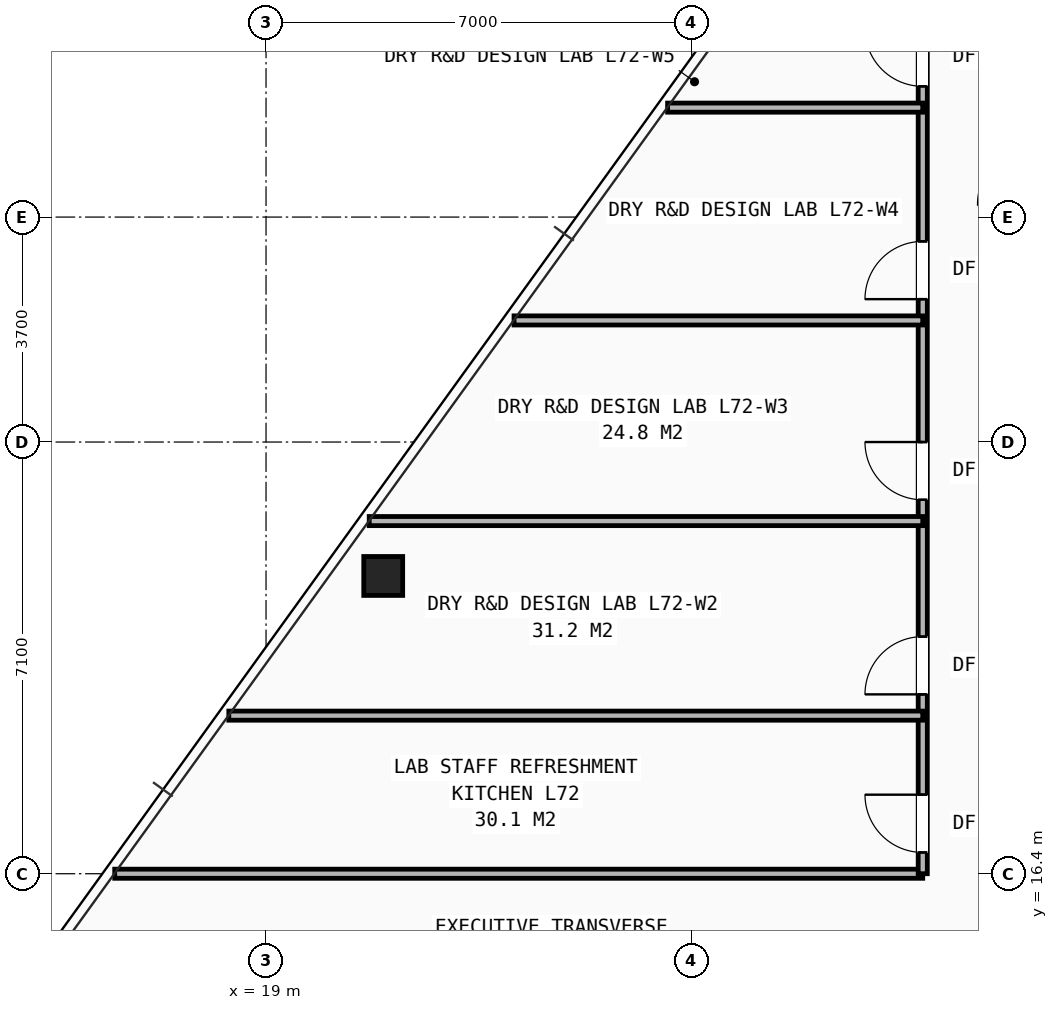
"""IFC4 building model, lengths in metres.
Left out: names, types, materials, properties, quantities, classifications, styles, units other than length and angle.
Written with IfcOpenShell. Run it as: python <this file> out.ifc"""

import sys

from ifc_helpers import new_model, si_unit, direction, frame, frame_2d, origin, origin_2d, place, context, subcontext, project, spatial, rectangle, hollow_rectangle, extrude, element, fill, save


model = new_model("IFC4")
c1 = context("Model", 3, precision=1e-05, world=origin(), true_north=direction((0.0, 1.0)))
c2 = subcontext(c1, "Body", "Model", "MODEL_VIEW")
j1 = project(units=[si_unit("LENGTHUNIT", "METRE"), si_unit("PLANEANGLEUNIT", "RADIAN")], contexts=[c1])
p1 = place(None, origin())
s1 = spatial("IfcSite", under=j1, at=p1, CompositionType="ELEMENT")
p2 = place(p1, origin())
s2 = spatial("IfcBuilding", under=s1, at=p2, CompositionType="ELEMENT")
p3 = place(p2, frame((0.0, 0.0, 255.0)))
s3 = spatial("IfcBuildingStorey", under=s2, at=p3, CompositionType="ELEMENT", Elevation=255.0)
p4 = place(p3, frame((20.927, 21.297, 0.0), z_axis=(0.0, 0.0, 1.0), x_axis=(1.0, 0.0, 0.0)))
e1 = element("IfcColumn", 1, at=p4, inside=s3, PredefinedType="COLUMN", context=c2, shape_type="SweptSolid", body=[
    extrude(hollow_rectangle(XDim=0.64, YDim=0.64, WallThickness=0.045, at=origin_2d()), origin(), (0.0, 0.0, 1.0), 3.5),
])
p5 = place(p3, frame((16.511, 16.4, 0.0), z_axis=(0.0, 0.0, 1.0), x_axis=(1.0, 0.0, 0.0)))
e2 = element("IfcWall", 2, at=p5, inside=s3, PredefinedType="PARTITIONING", context=c2, shape_type="SweptSolid", body=[
    extrude(rectangle(XDim=13.289, YDim=0.15, at=frame_2d((6.644, 0.0))), origin(), (0.0, 0.0, 1.0), 2.292),
])
p6 = place(p3, frame((29.8, 16.4, 0.0), z_axis=(0.0, 0.0, 1.0), x_axis=(0.0, 1.0, 0.0)))
e3 = element("IfcWall", 3, at=p6, inside=s3, PredefinedType="PARTITIONING", context=c2, shape_type="SweptSolid", body=[
    extrude(rectangle(XDim=19.3, YDim=0.15, at=frame_2d((9.65, 0.0))), origin(), (0.0, 0.0, 1.0), 2.292),
])
p7 = place(p6, frame((0.35, 0.0, 0.0)))
e4 = element("IfcOpeningElement", 4, at=p7, cuts=e3, PredefinedType="OPENING", context=c2, shape_type="SweptSolid", body=[
    extrude(rectangle(XDim=0.95, YDim=2.1, at=frame_2d((0.475, 1.05))), frame((0.0, 0.085, 0.0), z_axis=(0.0, -1.0, 0.0), x_axis=(1.0, 0.0, 0.0)), (0.0, 0.0, 1.0), 0.17),
])
p8 = place(p6, frame((2.95, 0.0, 0.0)))
e5 = element("IfcOpeningElement", 5, at=p8, cuts=e3, PredefinedType="OPENING", context=c2, shape_type="SweptSolid", body=[
    extrude(rectangle(XDim=0.95, YDim=2.1, at=frame_2d((0.475, 1.05))), frame((0.0, 0.085, 0.0), z_axis=(0.0, -1.0, 0.0), x_axis=(1.0, 0.0, 0.0)), (0.0, 0.0, 1.0), 0.17),
])
p9 = place(p6, frame((6.15, 0.0, 0.0)))
e6 = element("IfcOpeningElement", 6, at=p9, cuts=e3, PredefinedType="OPENING", context=c2, shape_type="SweptSolid", body=[
    extrude(rectangle(XDim=0.95, YDim=2.1, at=frame_2d((0.475, 1.05))), frame((0.0, 0.085, 0.0), z_axis=(0.0, -1.0, 0.0), x_axis=(1.0, 0.0, 0.0)), (0.0, 0.0, 1.0), 0.17),
])
p10 = place(p6, frame((9.45, 0.0, 0.0)))
e7 = element("IfcOpeningElement", 7, at=p10, cuts=e3, PredefinedType="OPENING", context=c2, shape_type="SweptSolid", body=[
    extrude(rectangle(XDim=0.95, YDim=2.1, at=frame_2d((0.475, 1.05))), frame((0.0, 0.085, 0.0), z_axis=(0.0, -1.0, 0.0), x_axis=(1.0, 0.0, 0.0)), (0.0, 0.0, 1.0), 0.17),
])
p11 = place(p6, frame((12.95, 0.0, 0.0)))
e8 = element("IfcOpeningElement", 8, at=p11, cuts=e3, PredefinedType="OPENING", context=c2, shape_type="SweptSolid", body=[
    extrude(rectangle(XDim=0.95, YDim=2.1, at=frame_2d((0.475, 1.05))), frame((0.0, 0.085, 0.0), z_axis=(0.0, -1.0, 0.0), x_axis=(1.0, 0.0, 0.0)), (0.0, 0.0, 1.0), 0.17),
])
p12 = place(p3, frame((18.388, 19.0, 0.0), z_axis=(0.0, 0.0, 1.0), x_axis=(1.0, 0.0, 0.0)))
e9 = element("IfcWall", 9, at=p12, inside=s3, PredefinedType="PARTITIONING", context=c2, shape_type="SweptSolid", body=[
    extrude(rectangle(XDim=11.412, YDim=0.15, at=frame_2d((5.706, 0.0))), origin(), (0.0, 0.0, 1.0), 2.292),
])
p13 = place(p3, frame((20.697, 22.2, 0.0), z_axis=(0.0, 0.0, 1.0), x_axis=(1.0, 0.0, 0.0)))
e10 = element("IfcWall", 10, at=p13, inside=s3, PredefinedType="PARTITIONING", context=c2, shape_type="SweptSolid", body=[
    extrude(rectangle(XDim=9.103, YDim=0.15, at=frame_2d((4.552, 0.0))), origin(), (0.0, 0.0, 1.0), 2.628),
])
p14 = place(p3, frame((23.078, 25.5, 0.0), z_axis=(0.0, 0.0, 1.0), x_axis=(1.0, 0.0, 0.0)))
e11 = element("IfcWall", 11, at=p14, inside=s3, PredefinedType="PARTITIONING", context=c2, shape_type="SweptSolid", body=[
    extrude(rectangle(XDim=6.722, YDim=0.15, at=frame_2d((3.361, 0.0))), origin(), (0.0, 0.0, 1.0), 2.628),
])
p15 = place(p3, frame((25.604, 29.0, 0.0), z_axis=(0.0, 0.0, 1.0), x_axis=(1.0, 0.0, 0.0)))
e12 = element("IfcWall", 12, at=p15, inside=s3, PredefinedType="PARTITIONING", context=c2, shape_type="SweptSolid", body=[
    extrude(rectangle(XDim=4.196, YDim=0.15, at=frame_2d((2.098, 0.0))), origin(), (0.0, 0.0, 1.0), 2.628),
])
p16 = place(p7, origin())
e13 = element("IfcDoor", 13, at=p16, inside=s3, OperationType="SINGLE_SWING_RIGHT", PredefinedType="DOOR", context=c2, shape_type="SweptSolid", body=[
    extrude(rectangle(XDim=0.95, YDim=2.1, at=frame_2d((0.475, 1.05))), frame((0.0, 0.025, 0.0), z_axis=(0.0, -1.0, 0.0), x_axis=(1.0, 0.0, 0.0)), (0.0, 0.0, 1.0), 0.05),
])
fill(e4, e13)
p17 = place(p8, origin())
e14 = element("IfcDoor", 14, at=p17, inside=s3, OperationType="SINGLE_SWING_LEFT", PredefinedType="DOOR", context=c2, shape_type="SweptSolid", body=[
    extrude(rectangle(XDim=0.95, YDim=2.1, at=frame_2d((0.475, 1.05))), frame((0.0, 0.025, 0.0), z_axis=(0.0, -1.0, 0.0), x_axis=(1.0, 0.0, 0.0)), (0.0, 0.0, 1.0), 0.05),
])
fill(e5, e14)
p18 = place(p9, origin())
e15 = element("IfcDoor", 15, at=p18, inside=s3, OperationType="SINGLE_SWING_RIGHT", PredefinedType="DOOR", context=c2, shape_type="SweptSolid", body=[
    extrude(rectangle(XDim=0.95, YDim=2.1, at=frame_2d((0.475, 1.05))), frame((0.0, 0.025, 0.0), z_axis=(0.0, -1.0, 0.0), x_axis=(1.0, 0.0, 0.0)), (0.0, 0.0, 1.0), 0.05),
])
fill(e6, e15)
p19 = place(p10, origin())
e16 = element("IfcDoor", 16, at=p19, inside=s3, OperationType="SINGLE_SWING_LEFT", PredefinedType="DOOR", context=c2, shape_type="SweptSolid", body=[
    extrude(rectangle(XDim=0.95, YDim=2.1, at=frame_2d((0.475, 1.05))), frame((0.0, 0.025, 0.0), z_axis=(0.0, -1.0, 0.0), x_axis=(1.0, 0.0, 0.0)), (0.0, 0.0, 1.0), 0.05),
])
fill(e7, e16)
p20 = place(p11, origin())
e17 = element("IfcDoor", 17, at=p20, inside=s3, OperationType="SINGLE_SWING_RIGHT", PredefinedType="DOOR", context=c2, shape_type="SweptSolid", body=[
    extrude(rectangle(XDim=0.95, YDim=2.1, at=frame_2d((0.475, 1.05))), frame((0.0, 0.025, 0.0), z_axis=(0.0, -1.0, 0.0), x_axis=(1.0, 0.0, 0.0)), (0.0, 0.0, 1.0), 0.05),
])
fill(e8, e17)
save(model, sys.argv[1])
